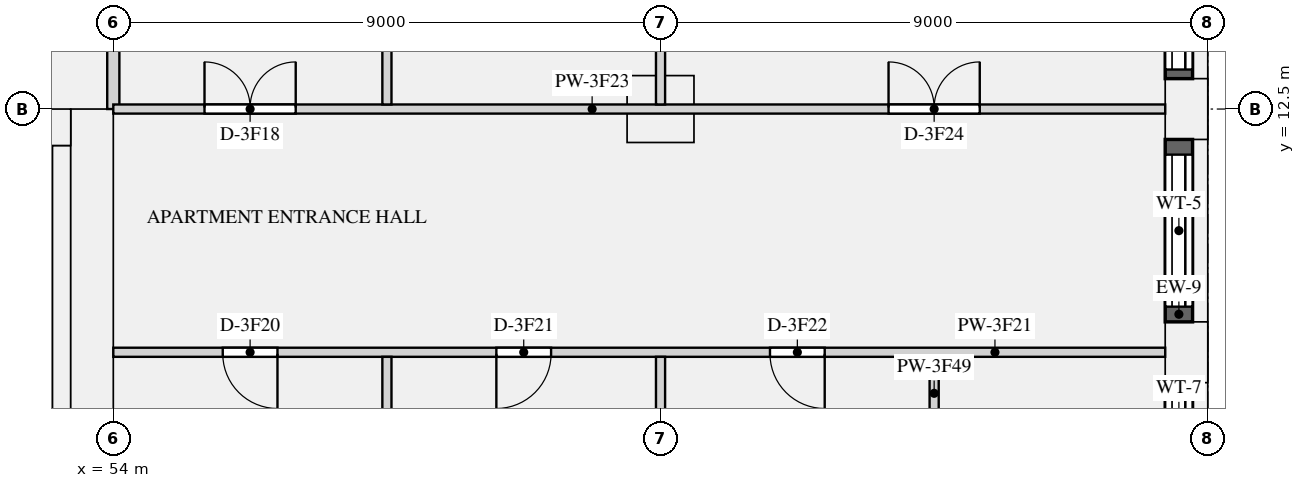
"""IFC4 building model, lengths in metres.
Left out: names, types, materials, properties, quantities, classifications, styles, units other than length and angle.
Written with IfcOpenShell. Run it as: python <this file> out.ifc"""

import sys

from ifc_helpers import new_model, si_unit, direction, frame, frame_2d, origin, origin_2d, place, context, subcontext, project, spatial, rectangle, extrude, element, fill, save


model = new_model("IFC4")
c1 = context("Model", 3, precision=1e-05, world=origin(), true_north=direction((0.0, 1.0)))
c2 = subcontext(c1, "Body", "Model", "MODEL_VIEW")
j1 = project(units=[si_unit("LENGTHUNIT", "METRE"), si_unit("PLANEANGLEUNIT", "RADIAN")], contexts=[c1])
p1 = place(None, origin())
s1 = spatial("IfcSite", under=j1, at=p1, CompositionType="ELEMENT")
p2 = place(p1, origin())
s2 = spatial("IfcBuilding", under=s1, at=p2, CompositionType="ELEMENT")
p3 = place(p2, frame((0.0, 0.0, 179.1)))
s3 = spatial("IfcBuildingStorey", under=s2, at=p3, CompositionType="ELEMENT", Elevation=179.1)
for number, where, z_axis, x_axis in (
    (1, (71.65, 8.5, 0.0), (0.0, 0.0, 1.0), (0.0, 1.0, 0.0)),
    (2, (71.65, 12.5, 0.0), (0.0, 0.0, 1.0), (0.0, 1.0, 0.0)),
):
    element("IfcColumn", number, at=place(p3, frame(where, z_axis=z_axis, x_axis=x_axis)), inside=s3, PredefinedType="USERDEFINED", context=c2, shape_type="SweptSolid", body=[
        extrude(rectangle(XDim=1.0, YDim=0.7, at=origin_2d()), origin(), (0.0, 0.0, 1.0), 3.15),
    ])
p4 = place(p3, frame((63.0, 12.5, 0.0), z_axis=(0.0, 0.0, 1.0), x_axis=(1.0, 0.0, 0.0)))
e3 = element("IfcColumn", 3, at=p4, inside=s3, PredefinedType="COLUMN", context=c2, shape_type="SweptSolid", body=[
    extrude(rectangle(XDim=1.1, YDim=1.1, at=origin_2d()), origin(), (0.0, 0.0, 1.0), 3.15),
])
p5 = place(p3, frame((53.65, 0.0, 0.0), z_axis=(0.0, 0.0, 1.0), x_axis=(0.0, 1.0, 0.0)))
e4 = element("IfcWall", 4, at=p5, inside=s3, PredefinedType="SHEAR", context=c2, shape_type="SweptSolid", body=[
    extrude(rectangle(XDim=12.5, YDim=0.7, at=frame_2d((6.25, 0.0))), origin(), (0.0, 0.0, 1.0), 3.15),
])
p6 = place(p3, frame((18.7, 12.2, 0.0), z_axis=(0.0, 0.0, 1.0), x_axis=(1.0, 0.0, 0.0)))
e5 = element("IfcWall", 5, at=p6, inside=s3, PredefinedType="SHEAR", context=c2, shape_type="SweptSolid", body=[
    extrude(rectangle(XDim=34.6, YDim=0.6, at=frame_2d((17.3, 0.0))), origin(), (0.0, 0.0, 1.0), 3.15),
])
p7 = place(p6, frame((24.475, 0.0, 0.0)))
e6 = element("IfcOpeningElement", 6, at=p7, cuts=e5, PredefinedType="OPENING", context=c2, shape_type="SweptSolid", body=[
    extrude(rectangle(XDim=1.1, YDim=2.1, at=frame_2d((0.55, 1.05))), frame((0.0, 0.31, 0.0), z_axis=(0.0, -1.0, 0.0), x_axis=(1.0, 0.0, 0.0)), (0.0, 0.0, 1.0), 0.62),
])
p8 = place(p6, frame((26.725, 0.0, 0.0)))
e7 = element("IfcOpeningElement", 7, at=p8, cuts=e5, PredefinedType="OPENING", context=c2, shape_type="SweptSolid", body=[
    extrude(rectangle(XDim=1.1, YDim=2.1, at=frame_2d((0.55, 1.05))), frame((0.0, 0.31, 0.0), z_axis=(0.0, -1.0, 0.0), x_axis=(1.0, 0.0, 0.0)), (0.0, 0.0, 1.0), 0.62),
])
p9 = place(p6, frame((28.975, 0.0, 0.0)))
e8 = element("IfcOpeningElement", 8, at=p9, cuts=e5, PredefinedType="OPENING", context=c2, shape_type="SweptSolid", body=[
    extrude(rectangle(XDim=1.1, YDim=2.1, at=frame_2d((0.55, 1.05))), frame((0.0, 0.31, 0.0), z_axis=(0.0, -1.0, 0.0), x_axis=(1.0, 0.0, 0.0)), (0.0, 0.0, 1.0), 0.62),
])
p10 = place(p6, frame((4.85, 0.0, 0.0)))
e9 = element("IfcOpeningElement", 9, at=p10, cuts=e5, PredefinedType="OPENING", context=c2, shape_type="SweptSolid", body=[
    extrude(rectangle(XDim=0.9, YDim=2.1, at=frame_2d((0.45, 1.05))), frame((0.0, 0.31, 0.0), z_axis=(0.0, -1.0, 0.0), x_axis=(1.0, 0.0, 0.0)), (0.0, 0.0, 1.0), 0.62),
])
p11 = place(p6, frame((11.85, 0.0, 0.0)))
e10 = element("IfcOpeningElement", 10, at=p11, cuts=e5, PredefinedType="OPENING", context=c2, shape_type="SweptSolid", body=[
    extrude(rectangle(XDim=0.9, YDim=2.1, at=frame_2d((0.45, 1.05))), frame((0.0, 0.31, 0.0), z_axis=(0.0, -1.0, 0.0), x_axis=(1.0, 0.0, 0.0)), (0.0, 0.0, 1.0), 0.62),
])
p12 = place(p6, frame((18.35, 0.0, 0.0)))
e11 = element("IfcOpeningElement", 11, at=p12, cuts=e5, PredefinedType="OPENING", context=c2, shape_type="SweptSolid", body=[
    extrude(rectangle(XDim=0.9, YDim=2.1, at=frame_2d((0.45, 1.05))), frame((0.0, 0.31, 0.0), z_axis=(0.0, -1.0, 0.0), x_axis=(1.0, 0.0, 0.0)), (0.0, 0.0, 1.0), 0.62),
])
p13 = place(p6, frame((1.45, 0.0, 0.0)))
e12 = element("IfcOpeningElement", 12, at=p13, cuts=e5, PredefinedType="OPENING", context=c2, shape_type="SweptSolid", body=[
    extrude(rectangle(XDim=1.2, YDim=2.1, at=frame_2d((0.6, 1.05))), frame((0.0, 0.31, 0.0), z_axis=(0.0, -1.0, 0.0), x_axis=(1.0, 0.0, 0.0)), (0.0, 0.0, 1.0), 0.62),
])
p14 = place(p6, frame((31.95, 0.0, 0.0)))
e13 = element("IfcOpeningElement", 13, at=p14, cuts=e5, PredefinedType="OPENING", context=c2, shape_type="SweptSolid", body=[
    extrude(rectangle(XDim=1.2, YDim=2.1, at=frame_2d((0.6, 1.05))), frame((0.0, 0.31, 0.0), z_axis=(0.0, -1.0, 0.0), x_axis=(1.0, 0.0, 0.0)), (0.0, 0.0, 1.0), 0.62),
])
p15 = place(p3, frame((53.15, 1.0, 0.0), z_axis=(0.0, 0.0, 1.0), x_axis=(0.0, 1.0, 0.0)))
e14 = element("IfcWall", 14, at=p15, inside=s3, PredefinedType="SHEAR", context=c2, shape_type="SweptSolid", body=[
    extrude(rectangle(XDim=10.9, YDim=0.3, at=frame_2d((5.45, 0.0))), origin(), (0.0, 0.0, 1.0), 3.15),
])
p16 = place(p3, frame((71.525, 5.5, 0.9), z_axis=(0.0, 0.0, 1.0), x_axis=(0.0, 1.0, 0.0)))
e15 = element("IfcWall", 15, at=p16, inside=s3, PredefinedType="SOLIDWALL", context=c2, shape_type="SweptSolid", body=[
    extrude(rectangle(XDim=2.5, YDim=0.45, at=frame_2d((1.25, 0.0))), origin(), (0.0, 0.0, 1.0), 1.93),
])
p17 = place(p16, frame((0.25, 0.0, 0.15)))
e16 = element("IfcOpeningElement", 16, at=p17, cuts=e15, PredefinedType="OPENING", context=c2, shape_type="SweptSolid", body=[
    extrude(rectangle(XDim=2.0, YDim=1.5, at=frame_2d((1.0, 0.75))), frame((0.0, 0.235, 0.0), z_axis=(0.0, -1.0, 0.0), x_axis=(1.0, 0.0, 0.0)), (0.0, 0.0, 1.0), 0.47),
])
p18 = place(p3, frame((71.525, 9.0, 0.9), z_axis=(0.0, 0.0, 1.0), x_axis=(0.0, 1.0, 0.0)))
e17 = element("IfcWall", 17, at=p18, inside=s3, PredefinedType="SOLIDWALL", context=c2, shape_type="SweptSolid", body=[
    extrude(rectangle(XDim=3.0, YDim=0.45, at=frame_2d((1.5, 0.0))), origin(), (0.0, 0.0, 1.0), 1.93),
])
p19 = place(p18, frame((0.25, 0.0, 0.15)))
e18 = element("IfcOpeningElement", 18, at=p19, cuts=e17, PredefinedType="OPENING", context=c2, shape_type="SweptSolid", body=[
    extrude(rectangle(XDim=2.5, YDim=1.5, at=frame_2d((1.25, 0.75))), frame((0.0, 0.235, 0.0), z_axis=(0.0, -1.0, 0.0), x_axis=(1.0, 0.0, 0.0)), (0.0, 0.0, 1.0), 0.47),
])
p20 = place(p3, frame((71.525, 13.0, 0.9), z_axis=(0.0, 0.0, 1.0), x_axis=(0.0, 1.0, 0.0)))
e19 = element("IfcWall", 19, at=p20, inside=s3, PredefinedType="SOLIDWALL", context=c2, shape_type="SweptSolid", body=[
    extrude(rectangle(XDim=2.8, YDim=0.45, at=frame_2d((1.4, 0.0))), origin(), (0.0, 0.0, 1.0), 1.93),
])
p21 = place(p20, frame((0.15, 0.0, 0.15)))
e20 = element("IfcOpeningElement", 20, at=p21, cuts=e19, PredefinedType="OPENING", context=c2, shape_type="SweptSolid", body=[
    extrude(rectangle(XDim=2.5, YDim=1.5, at=frame_2d((1.25, 0.75))), frame((0.0, 0.235, 0.0), z_axis=(0.0, -1.0, 0.0), x_axis=(1.0, 0.0, 0.0)), (0.0, 0.0, 1.0), 0.47),
])
p22 = place(p3, frame((54.0, 12.5, 0.0), z_axis=(0.0, 0.0, 1.0), x_axis=(0.0, 1.0, 0.0)))
e21 = element("IfcWall", 21, at=p22, inside=s3, PredefinedType="PARTITIONING", context=c2, shape_type="SweptSolid", body=[
    extrude(rectangle(XDim=3.4, YDim=0.2, at=frame_2d((1.7, 0.0))), origin(), (0.0, 0.0, 1.0), 2.83),
])
p23 = place(p3, frame((54.0, 8.5, 0.0), z_axis=(0.0, 0.0, 1.0), x_axis=(1.0, 0.0, 0.0)))
e22 = element("IfcWall", 22, at=p23, inside=s3, PredefinedType="PARTITIONING", context=c2, shape_type="SweptSolid", body=[
    extrude(rectangle(XDim=17.3, YDim=0.15, at=frame_2d((8.65, 0.0))), origin(), (0.0, 0.0, 1.0), 2.83),
])
p24 = place(p23, frame((1.8, 0.0, 0.0)))
e23 = element("IfcOpeningElement", 23, at=p24, cuts=e22, PredefinedType="OPENING", context=c2, shape_type="SweptSolid", body=[
    extrude(rectangle(XDim=0.9, YDim=2.1, at=frame_2d((0.45, 1.05))), frame((0.0, 0.085, 0.0), z_axis=(0.0, -1.0, 0.0), x_axis=(1.0, 0.0, 0.0)), (0.0, 0.0, 1.0), 0.17),
])
p25 = place(p23, frame((6.3, 0.0, 0.0)))
e24 = element("IfcOpeningElement", 24, at=p25, cuts=e22, PredefinedType="OPENING", context=c2, shape_type="SweptSolid", body=[
    extrude(rectangle(XDim=0.9, YDim=2.1, at=frame_2d((0.45, 1.05))), frame((0.0, 0.085, 0.0), z_axis=(0.0, -1.0, 0.0), x_axis=(1.0, 0.0, 0.0)), (0.0, 0.0, 1.0), 0.17),
])
p26 = place(p23, frame((10.8, 0.0, 0.0)))
e25 = element("IfcOpeningElement", 25, at=p26, cuts=e22, PredefinedType="OPENING", context=c2, shape_type="SweptSolid", body=[
    extrude(rectangle(XDim=0.9, YDim=2.1, at=frame_2d((0.45, 1.05))), frame((0.0, 0.085, 0.0), z_axis=(0.0, -1.0, 0.0), x_axis=(1.0, 0.0, 0.0)), (0.0, 0.0, 1.0), 0.17),
])
p27 = place(p3, frame((54.0, 12.5, 0.0), z_axis=(0.0, 0.0, 1.0), x_axis=(1.0, 0.0, 0.0)))
e26 = element("IfcWall", 26, at=p27, inside=s3, PredefinedType="PARTITIONING", context=c2, shape_type="SweptSolid", body=[
    extrude(rectangle(XDim=17.3, YDim=0.15, at=frame_2d((8.65, 0.0))), origin(), (0.0, 0.0, 1.0), 2.83),
])
p28 = place(p27, frame((1.5, 0.0, 0.0)))
e27 = element("IfcOpeningElement", 27, at=p28, cuts=e26, PredefinedType="OPENING", context=c2, shape_type="SweptSolid", body=[
    extrude(rectangle(XDim=1.5, YDim=2.1, at=frame_2d((0.75, 1.05))), frame((0.0, 0.085, 0.0), z_axis=(0.0, -1.0, 0.0), x_axis=(1.0, 0.0, 0.0)), (0.0, 0.0, 1.0), 0.17),
])
p29 = place(p27, frame((12.75, 0.0, 0.0)))
e28 = element("IfcOpeningElement", 28, at=p29, cuts=e26, PredefinedType="OPENING", context=c2, shape_type="SweptSolid", body=[
    extrude(rectangle(XDim=1.5, YDim=2.1, at=frame_2d((0.75, 1.05))), frame((0.0, 0.085, 0.0), z_axis=(0.0, -1.0, 0.0), x_axis=(1.0, 0.0, 0.0)), (0.0, 0.0, 1.0), 0.17),
])
p30 = place(p3, frame((58.5, 0.7, 0.0), z_axis=(0.0, 0.0, 1.0), x_axis=(0.0, 1.0, 0.0)))
e29 = element("IfcWall", 29, at=p30, inside=s3, PredefinedType="PARTITIONING", context=c2, shape_type="SweptSolid", body=[
    extrude(rectangle(XDim=7.725, YDim=0.15, at=frame_2d((3.863, 0.0))), origin(), (0.0, 0.0, 1.0), 2.83),
])
p31 = place(p3, frame((58.5, 12.575, 0.0), z_axis=(0.0, 0.0, 1.0), x_axis=(0.0, 1.0, 0.0)))
e30 = element("IfcWall", 30, at=p31, inside=s3, PredefinedType="PARTITIONING", context=c2, shape_type="SweptSolid", body=[
    extrude(rectangle(XDim=10.325, YDim=0.15, at=frame_2d((5.163, 0.0))), origin(), (0.0, 0.0, 1.0), 2.83),
])
p32 = place(p31, frame((4.75, 0.0, 0.0)))
e31 = element("IfcOpeningElement", 31, at=p32, cuts=e30, PredefinedType="OPENING", context=c2, shape_type="SweptSolid", body=[
    extrude(rectangle(XDim=0.9, YDim=2.1, at=frame_2d((0.45, 1.05))), frame((0.0, 0.085, 0.0), z_axis=(0.0, -1.0, 0.0), x_axis=(1.0, 0.0, 0.0)), (0.0, 0.0, 1.0), 0.17),
])
p33 = place(p3, frame((63.0, 0.7, 0.0), z_axis=(0.0, 0.0, 1.0), x_axis=(0.0, 1.0, 0.0)))
e32 = element("IfcWall", 32, at=p33, inside=s3, PredefinedType="PARTITIONING", context=c2, shape_type="SweptSolid", body=[
    extrude(rectangle(XDim=7.725, YDim=0.15, at=frame_2d((3.863, 0.0))), origin(), (0.0, 0.0, 1.0), 2.83),
])
p34 = place(p3, frame((63.0, 12.575, 0.0), z_axis=(0.0, 0.0, 1.0), x_axis=(0.0, 1.0, 0.0)))
e33 = element("IfcWall", 33, at=p34, inside=s3, PredefinedType="PARTITIONING", context=c2, shape_type="SweptSolid", body=[
    extrude(rectangle(XDim=16.35, YDim=0.15, at=frame_2d((8.175, 0.0))), origin(), (0.0, 0.0, 1.0), 2.83),
])
p35 = place(p34, frame((3.75, 0.0, 0.0)))
e34 = element("IfcOpeningElement", 34, at=p35, cuts=e33, PredefinedType="OPENING", context=c2, shape_type="SweptSolid", body=[
    extrude(rectangle(XDim=0.9, YDim=2.1, at=frame_2d((0.45, 1.05))), frame((0.0, 0.085, 0.0), z_axis=(0.0, -1.0, 0.0), x_axis=(1.0, 0.0, 0.0)), (0.0, 0.0, 1.0), 0.17),
])
p36 = place(p34, frame((13.75, 0.0, 0.0)))
e35 = element("IfcOpeningElement", 35, at=p36, cuts=e33, PredefinedType="OPENING", context=c2, shape_type="SweptSolid", body=[
    extrude(rectangle(XDim=0.9, YDim=2.1, at=frame_2d((0.45, 1.05))), frame((0.0, 0.085, 0.0), z_axis=(0.0, -1.0, 0.0), x_axis=(1.0, 0.0, 0.0)), (0.0, 0.0, 1.0), 0.17),
])
p37 = place(p3, frame((67.5, 5.2, 0.0), z_axis=(0.0, 0.0, 1.0), x_axis=(0.0, 1.0, 0.0)))
e36 = element("IfcWall", 36, at=p37, inside=s3, PredefinedType="PARTITIONING", context=c2, shape_type="SweptSolid", body=[
    extrude(rectangle(XDim=3.225, YDim=0.15, at=frame_2d((1.613, 0.0))), origin(), (0.0, 0.0, 1.0), 2.83),
])
p38 = place(p37, frame((1.125, 0.0, 0.0)))
e37 = element("IfcOpeningElement", 37, at=p38, cuts=e36, PredefinedType="OPENING", context=c2, shape_type="SweptSolid", body=[
    extrude(rectangle(XDim=0.9, YDim=2.1, at=frame_2d((0.45, 1.05))), frame((0.0, 0.085, 0.0), z_axis=(0.0, -1.0, 0.0), x_axis=(1.0, 0.0, 0.0)), (0.0, 0.0, 1.0), 0.17),
])
p39 = place(p17, origin())
e38 = element("IfcWindow", 38, at=p39, inside=s3, PartitioningType="SINGLE_PANEL", PredefinedType="WINDOW", context=c2, shape_type="SweptSolid", body=[
    extrude(rectangle(XDim=2.0, YDim=1.5, at=frame_2d((1.0, 0.75))), frame((0.0, -0.065, 0.0), z_axis=(0.0, -1.0, 0.0), x_axis=(1.0, 0.0, 0.0)), (0.0, 0.0, 1.0), 0.06),
])
fill(e16, e38)
p40 = place(p19, origin())
e39 = element("IfcWindow", 39, at=p40, inside=s3, PartitioningType="SINGLE_PANEL", PredefinedType="WINDOW", context=c2, shape_type="SweptSolid", body=[
    extrude(rectangle(XDim=2.5, YDim=1.5, at=frame_2d((1.25, 0.75))), frame((0.0, -0.065, 0.0), z_axis=(0.0, -1.0, 0.0), x_axis=(1.0, 0.0, 0.0)), (0.0, 0.0, 1.0), 0.06),
])
fill(e18, e39)
p41 = place(p21, origin())
e40 = element("IfcWindow", 40, at=p41, inside=s3, PartitioningType="SINGLE_PANEL", PredefinedType="WINDOW", context=c2, shape_type="SweptSolid", body=[
    extrude(rectangle(XDim=2.5, YDim=1.5, at=frame_2d((1.25, 0.75))), frame((0.0, -0.065, 0.0), z_axis=(0.0, -1.0, 0.0), x_axis=(1.0, 0.0, 0.0)), (0.0, 0.0, 1.0), 0.06),
])
fill(e20, e40)
p42 = place(p28, origin())
e41 = element("IfcDoor", 41, at=p42, inside=s3, OperationType="DOUBLE_DOOR_SINGLE_SWING", PredefinedType="DOOR", context=c2, shape_type="SweptSolid", body=[
    extrude(rectangle(XDim=1.5, YDim=2.1, at=frame_2d((0.75, 1.05))), frame((0.0, 0.025, 0.0), z_axis=(0.0, -1.0, 0.0), x_axis=(1.0, 0.0, 0.0)), (0.0, 0.0, 1.0), 0.05),
])
fill(e27, e41)
p43 = place(p24, frame((0.9, 0.0, 0.0), z_axis=(0.0, 0.0, 1.0), x_axis=(-1.0, 0.0, 0.0)))
e42 = element("IfcDoor", 42, at=p43, inside=s3, OperationType="SINGLE_SWING_LEFT", PredefinedType="DOOR", context=c2, shape_type="SweptSolid", body=[
    extrude(rectangle(XDim=0.9, YDim=2.1, at=frame_2d((0.45, 1.05))), frame((0.0, 0.025, 0.0), z_axis=(0.0, -1.0, 0.0), x_axis=(1.0, 0.0, 0.0)), (0.0, 0.0, 1.0), 0.05),
])
fill(e23, e42)
p44 = place(p25, frame((0.9, 0.0, 0.0), z_axis=(0.0, 0.0, 1.0), x_axis=(-1.0, 0.0, 0.0)))
e43 = element("IfcDoor", 43, at=p44, inside=s3, OperationType="SINGLE_SWING_RIGHT", PredefinedType="DOOR", context=c2, shape_type="SweptSolid", body=[
    extrude(rectangle(XDim=0.9, YDim=2.1, at=frame_2d((0.45, 1.05))), frame((0.0, 0.025, 0.0), z_axis=(0.0, -1.0, 0.0), x_axis=(1.0, 0.0, 0.0)), (0.0, 0.0, 1.0), 0.05),
])
fill(e24, e43)
p45 = place(p26, frame((0.9, 0.0, 0.0), z_axis=(0.0, 0.0, 1.0), x_axis=(-1.0, 0.0, 0.0)))
e44 = element("IfcDoor", 44, at=p45, inside=s3, OperationType="SINGLE_SWING_LEFT", PredefinedType="DOOR", context=c2, shape_type="SweptSolid", body=[
    extrude(rectangle(XDim=0.9, YDim=2.1, at=frame_2d((0.45, 1.05))), frame((0.0, 0.025, 0.0), z_axis=(0.0, -1.0, 0.0), x_axis=(1.0, 0.0, 0.0)), (0.0, 0.0, 1.0), 0.05),
])
fill(e25, e44)
p46 = place(p29, origin())
e45 = element("IfcDoor", 45, at=p46, inside=s3, OperationType="DOUBLE_DOOR_SINGLE_SWING", PredefinedType="DOOR", context=c2, shape_type="SweptSolid", body=[
    extrude(rectangle(XDim=1.5, YDim=2.1, at=frame_2d((0.75, 1.05))), frame((0.0, 0.025, 0.0), z_axis=(0.0, -1.0, 0.0), x_axis=(1.0, 0.0, 0.0)), (0.0, 0.0, 1.0), 0.05),
])
fill(e28, e45)
save(model, sys.argv[1])
